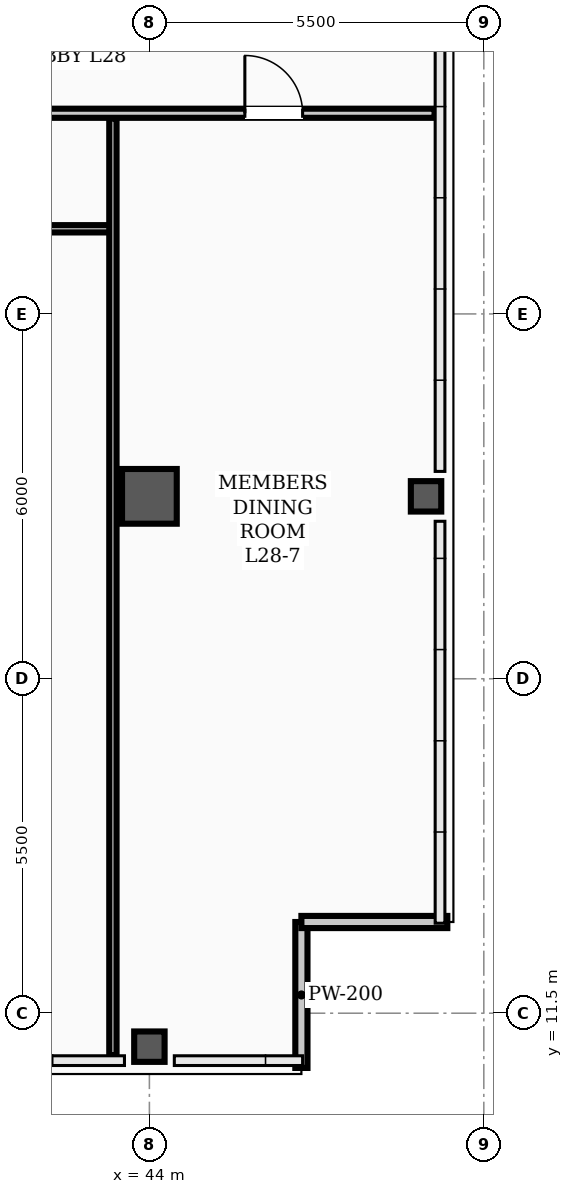
"""IFC4 building model, lengths in metres.
Left out: names, types, materials, properties, quantities, classifications, styles, units other than length and angle.
Written with IfcOpenShell. Run it as: python <this file> out.ifc"""

import sys

from ifc_helpers import new_model, si_unit, direction, frame, frame_2d, origin, origin_2d, place, context, subcontext, project, spatial, rectangle, hollow_rectangle, extrude, element, fill, save


model = new_model("IFC4")
c1 = context("Model", 3, precision=1e-05, world=origin(), true_north=direction((0.0, 1.0)))
c2 = subcontext(c1, "Body", "Model", "MODEL_VIEW")
j1 = project(units=[si_unit("LENGTHUNIT", "METRE"), si_unit("PLANEANGLEUNIT", "RADIAN")], contexts=[c1])
p1 = place(None, origin())
s1 = spatial("IfcSite", under=j1, at=p1, CompositionType="ELEMENT")
p2 = place(p1, origin())
s2 = spatial("IfcBuilding", under=s1, at=p2, CompositionType="ELEMENT")
p3 = place(p2, frame((0.0, 0.0, 114.9)))
s3 = spatial("IfcBuildingStorey", under=s2, at=p3, CompositionType="ELEMENT", Elevation=114.9)
p4 = place(p3, frame((44.0, 20.0, 0.0), z_axis=(0.0, 0.0, 1.0), x_axis=(1.0, 0.0, 0.0)))
e1 = element("IfcColumn", 1, at=p4, inside=s3, PredefinedType="COLUMN", context=c2, shape_type="SweptSolid", body=[
    extrude(hollow_rectangle(XDim=0.9, YDim=0.9, WallThickness=0.035, InnerFilletRadius=0.017, OuterFilletRadius=0.052, at=origin_2d()), origin(), (0.0, 0.0, 1.0), 3.9),
])
for number, where, z_axis, x_axis in (
    (2, (44.0, 10.95, 0.0), (0.0, 0.0, 1.0), (1.0, 0.0, 0.0)),
    (3, (48.55, 20.0, 0.0), (0.0, 0.0, 1.0), (1.0, 0.0, 0.0)),
):
    element("IfcColumn", number, at=place(p3, frame(where, z_axis=z_axis, x_axis=x_axis)), inside=s3, PredefinedType="COLUMN", context=c2, shape_type="SweptSolid", body=[
        extrude(hollow_rectangle(XDim=0.5, YDim=0.5, WallThickness=0.024, InnerFilletRadius=0.012, OuterFilletRadius=0.036, at=origin_2d()), origin(), (0.0, 0.0, 1.0), 3.9),
    ])
for number, where, z_axis, x_axis in (
    (4, (46.5, 10.6, 0.0), (0.0, 0.0, 1.0), (0.0, 1.0, 0.0)),
    (5, (46.5, 13.0, 0.0), (0.0, 0.0, 1.0), (1.0, 0.0, 0.0)),
):
    element("IfcWall", number, at=place(p3, frame(where, z_axis=z_axis, x_axis=x_axis)), inside=s3, PredefinedType="PARAPET", context=c2, shape_type="SweptSolid", body=[
        extrude(rectangle(XDim=2.4, YDim=0.2, at=frame_2d((1.2, 0.0))), origin(), (0.0, 0.0, 1.0), 1.2),
    ])
p5 = place(p3, frame((2.31, 26.3, 0.0), z_axis=(0.0, 0.0, 1.0), x_axis=(1.0, 0.0, 0.0)))
e6 = element("IfcWall", 6, at=p5, inside=s3, PredefinedType="PARTITIONING", context=c2, shape_type="SweptSolid", body=[
    extrude(rectangle(XDim=46.38, YDim=0.15, at=frame_2d((23.19, 0.0))), origin(), (0.0, 0.0, 1.0), 3.1),
])
p6 = place(p5, frame((12.415, 0.0, 0.0)))
e7 = element("IfcOpeningElement", 7, at=p6, cuts=e6, PredefinedType="OPENING", context=c2, shape_type="SweptSolid", body=[
    extrude(rectangle(XDim=0.95, YDim=2.08, at=frame_2d((0.475, 1.04))), frame((0.0, 0.085, 0.0), z_axis=(0.0, -1.0, 0.0), x_axis=(1.0, 0.0, 0.0)), (0.0, 0.0, 1.0), 0.17),
])
p7 = place(p5, frame((17.815, 0.0, 0.0)))
e8 = element("IfcOpeningElement", 8, at=p7, cuts=e6, PredefinedType="OPENING", context=c2, shape_type="SweptSolid", body=[
    extrude(rectangle(XDim=0.95, YDim=2.08, at=frame_2d((0.475, 1.04))), frame((0.0, 0.085, 0.0), z_axis=(0.0, -1.0, 0.0), x_axis=(1.0, 0.0, 0.0)), (0.0, 0.0, 1.0), 0.17),
])
p8 = place(p5, frame((24.315, 0.0, 0.0)))
e9 = element("IfcOpeningElement", 9, at=p8, cuts=e6, PredefinedType="OPENING", context=c2, shape_type="SweptSolid", body=[
    extrude(rectangle(XDim=0.95, YDim=2.08, at=frame_2d((0.475, 1.04))), frame((0.0, 0.085, 0.0), z_axis=(0.0, -1.0, 0.0), x_axis=(1.0, 0.0, 0.0)), (0.0, 0.0, 1.0), 0.17),
])
p9 = place(p5, frame((30.915, 0.0, 0.0)))
e10 = element("IfcOpeningElement", 10, at=p9, cuts=e6, PredefinedType="OPENING", context=c2, shape_type="SweptSolid", body=[
    extrude(rectangle(XDim=0.95, YDim=2.08, at=frame_2d((0.475, 1.04))), frame((0.0, 0.085, 0.0), z_axis=(0.0, -1.0, 0.0), x_axis=(1.0, 0.0, 0.0)), (0.0, 0.0, 1.0), 0.17),
])
p10 = place(p5, frame((37.415, 0.0, 0.0)))
e11 = element("IfcOpeningElement", 11, at=p10, cuts=e6, PredefinedType="OPENING", context=c2, shape_type="SweptSolid", body=[
    extrude(rectangle(XDim=0.95, YDim=2.08, at=frame_2d((0.475, 1.04))), frame((0.0, 0.085, 0.0), z_axis=(0.0, -1.0, 0.0), x_axis=(1.0, 0.0, 0.0)), (0.0, 0.0, 1.0), 0.17),
])
p11 = place(p5, frame((43.26, 0.0, 0.0)))
e12 = element("IfcOpeningElement", 12, at=p11, cuts=e6, PredefinedType="OPENING", context=c2, shape_type="SweptSolid", body=[
    extrude(rectangle(XDim=0.95, YDim=2.08, at=frame_2d((0.475, 1.04))), frame((0.0, 0.085, 0.0), z_axis=(0.0, -1.0, 0.0), x_axis=(1.0, 0.0, 0.0)), (0.0, 0.0, 1.0), 0.17),
])
p12 = place(p3, frame((37.0, 24.4, 0.0), z_axis=(0.0, 0.0, 1.0), x_axis=(1.0, 0.0, 0.0)))
e13 = element("IfcWall", 13, at=p12, inside=s3, PredefinedType="PARTITIONING", context=c2, shape_type="SweptSolid", body=[
    extrude(rectangle(XDim=6.4, YDim=0.12, at=frame_2d((3.2, 0.0))), origin(), (0.0, 0.0, 1.0), 3.1),
])
p13 = place(p12, frame((2.725, 0.0, 0.0)))
e14 = element("IfcOpeningElement", 14, at=p13, cuts=e13, PredefinedType="OPENING", context=c2, shape_type="SweptSolid", body=[
    extrude(rectangle(XDim=0.95, YDim=2.08, at=frame_2d((0.475, 1.04))), frame((0.0, 0.07, 0.0), z_axis=(0.0, -1.0, 0.0), x_axis=(1.0, 0.0, 0.0)), (0.0, 0.0, 1.0), 0.14),
])
p14 = place(p3, frame((43.4, 10.81, 0.0), z_axis=(0.0, 0.0, 1.0), x_axis=(0.0, 1.0, 0.0)))
e15 = element("IfcWall", 15, at=p14, inside=s3, PredefinedType="PARTITIONING", context=c2, shape_type="SweptSolid", body=[
    extrude(rectangle(XDim=15.405, YDim=0.12, at=frame_2d((7.703, 0.0))), origin(), (0.0, 0.0, 1.0), 3.0),
])
p15 = place(p11, origin())
e16 = element("IfcDoor", 16, at=p15, inside=s3, OperationType="SINGLE_SWING_LEFT", PredefinedType="DOOR", context=c2, shape_type="SweptSolid", body=[
    extrude(rectangle(XDim=0.95, YDim=2.08, at=frame_2d((0.475, 1.04))), frame((0.0, 0.025, 0.0), z_axis=(0.0, -1.0, 0.0), x_axis=(1.0, 0.0, 0.0)), (0.0, 0.0, 1.0), 0.05),
])
fill(e12, e16)
save(model, sys.argv[1])
